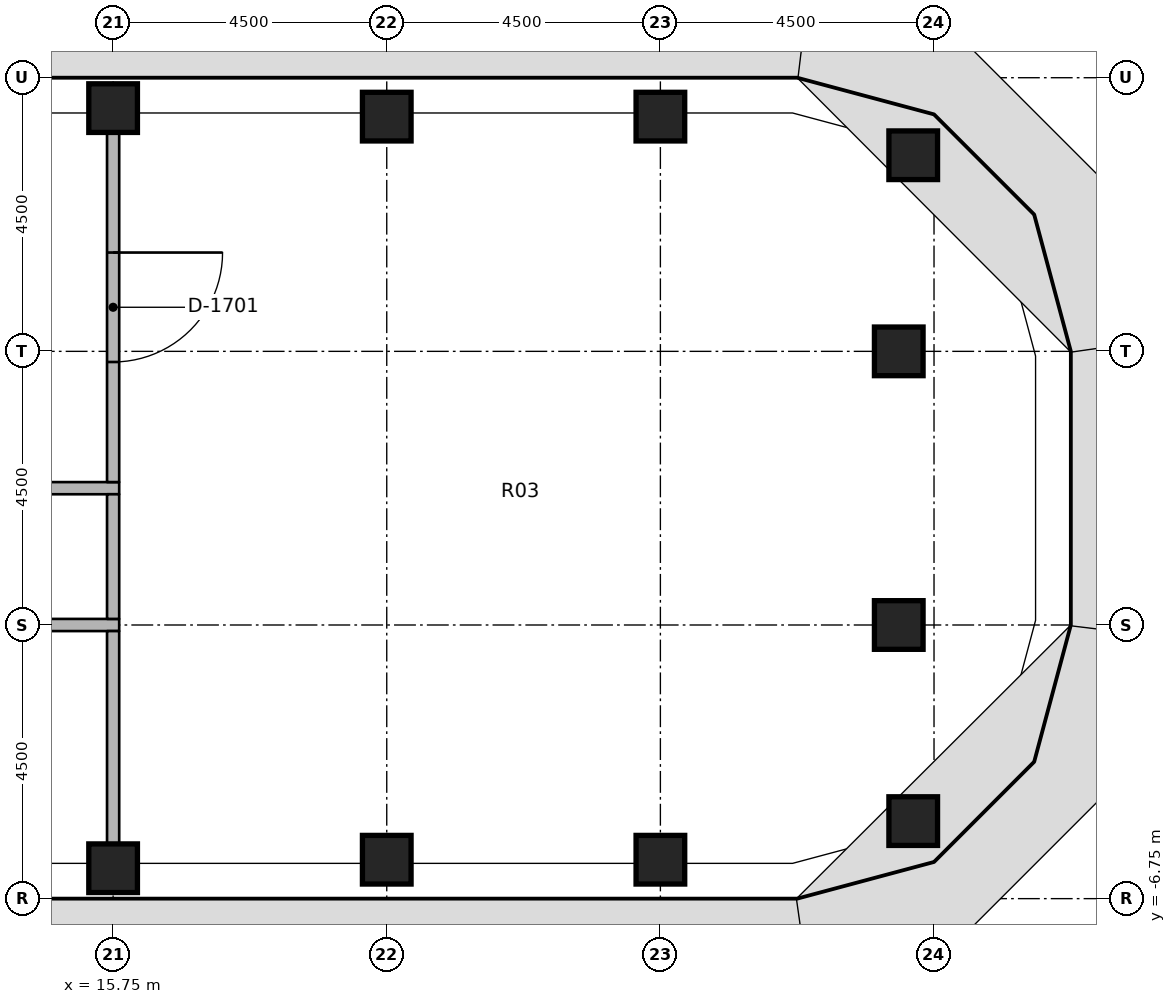
"""IFC4 building model, lengths in metres.
Left out: names, types, materials, properties, quantities, classifications, styles, units other than length and angle.
Written with IfcOpenShell. Run it as: python <this file> out.ifc"""

import sys

from ifc_helpers import new_model, si_unit, direction, frame, frame_2d, origin, origin_2d, place, context, subcontext, project, spatial, rectangle, extrude, element, fill, save


model = new_model("IFC4")
c1 = context("Model", 3, precision=1e-05, world=origin(), true_north=direction((0.0, 1.0)))
c2 = subcontext(c1, "Body", "Model", "MODEL_VIEW")
j1 = project(units=[si_unit("LENGTHUNIT", "METRE"), si_unit("PLANEANGLEUNIT", "RADIAN")], contexts=[c1])
p1 = place(None, origin())
s1 = spatial("IfcSite", under=j1, at=p1, CompositionType="ELEMENT")
p2 = place(p1, origin())
s2 = spatial("IfcBuilding", under=s1, at=p2, CompositionType="ELEMENT")
p3 = place(p2, frame((0.0, 0.0, 160.0)))
s3 = spatial("IfcBuildingStorey", under=s2, at=p3, CompositionType="ELEMENT", Elevation=160.0)
for number, where, z_axis, x_axis in (
    (1, (15.75, -6.25, 0.0), (0.0, 0.0, 1.0), (1.0, 0.0, 0.0)),
    (2, (15.75, 6.25, 0.0), (0.0, 0.0, 1.0), (1.0, 0.0, 0.0)),
    (3, (20.25, -6.11, 0.0), (0.0, 0.0, 1.0), (1.0, 0.0, 0.0)),
    (4, (20.25, 6.11, 0.0), (0.0, 0.0, 1.0), (1.0, 0.0, 0.0)),
    (5, (24.75, -6.11, 0.0), (0.0, 0.0, 1.0), (1.0, 0.0, 0.0)),
    (6, (24.75, 6.11, 0.0), (0.0, 0.0, 1.0), (1.0, 0.0, 0.0)),
    (7, (28.908, -5.475, 0.0), (0.0, 0.0, 1.0), (1.0, 0.0, 0.0)),
    (8, (28.67, -2.25, 0.0), (0.0, 0.0, 1.0), (1.0, 0.0, 0.0)),
    (9, (28.67, 2.25, 0.0), (0.0, 0.0, 1.0), (1.0, 0.0, 0.0)),
    (10, (28.908, 5.475, 0.0), (0.0, 0.0, 1.0), (1.0, 0.0, 0.0)),
):
    element("IfcColumn", number, at=place(p3, frame(where, z_axis=z_axis, x_axis=x_axis)), inside=s3, PredefinedType="COLUMN", context=c2, shape_type="SweptSolid", body=[
        extrude(rectangle(XDim=0.8, YDim=0.8, at=origin_2d()), origin(), (0.0, 0.0, 1.0), 3.65),
    ])
p4 = place(p3, frame((11.15, 0.0, 0.0), z_axis=(0.0, 0.0, 1.0), x_axis=(1.0, 0.0, 0.0)))
e11 = element("IfcWall", 11, at=p4, inside=s3, PredefinedType="PARTITIONING", context=c2, shape_type="SweptSolid", body=[
    extrude(rectangle(XDim=4.7, YDim=0.2, at=frame_2d((2.35, 0.0))), origin(), (0.0, 0.0, 1.0), 2.75),
])
p5 = place(p4, frame((1.85, 0.0, 0.0)))
e12 = element("IfcOpeningElement", 12, at=p5, cuts=e11, PredefinedType="OPENING", context=c2, shape_type="SweptSolid", body=[
    extrude(rectangle(XDim=1.0, YDim=2.1, at=frame_2d((0.5, 1.05))), frame((0.0, 0.11, 0.0), z_axis=(0.0, -1.0, 0.0), x_axis=(1.0, 0.0, 0.0)), (0.0, 0.0, 1.0), 0.22),
])
p6 = place(p3, frame((15.85, -2.25, 0.0), z_axis=(0.0, 0.0, 1.0), x_axis=(-1.0, 0.0, 0.0)))
e13 = element("IfcWall", 13, at=p6, inside=s3, PredefinedType="PARTITIONING", context=c2, shape_type="SweptSolid", body=[
    extrude(rectangle(XDim=4.7, YDim=0.2, at=frame_2d((2.35, 0.0))), origin(), (0.0, 0.0, 1.0), 2.75),
])
p7 = place(p6, frame((1.85, 0.0, 0.0)))
e14 = element("IfcOpeningElement", 14, at=p7, cuts=e13, PredefinedType="OPENING", context=c2, shape_type="SweptSolid", body=[
    extrude(rectangle(XDim=1.0, YDim=2.1, at=frame_2d((0.5, 1.05))), frame((0.0, 0.11, 0.0), z_axis=(0.0, -1.0, 0.0), x_axis=(1.0, 0.0, 0.0)), (0.0, 0.0, 1.0), 0.22),
])
p8 = place(p3, frame((15.75, -2.15, 0.0), z_axis=(0.0, 0.0, 1.0), x_axis=(0.0, 1.0, 0.0)))
e15 = element("IfcWall", 15, at=p8, inside=s3, PredefinedType="PARTITIONING", context=c2, shape_type="SweptSolid", body=[
    extrude(rectangle(XDim=2.05, YDim=0.2, at=frame_2d((1.025, 0.0))), origin(), (0.0, 0.0, 1.0), 2.75),
])
p9 = place(p3, frame((15.75, 5.85, 0.0), z_axis=(0.0, 0.0, 1.0), x_axis=(0.0, -1.0, 0.0)))
e16 = element("IfcWall", 16, at=p9, inside=s3, PredefinedType="PARTITIONING", context=c2, shape_type="SweptSolid", body=[
    extrude(rectangle(XDim=5.75, YDim=0.2, at=frame_2d((2.875, 0.0))), origin(), (0.0, 0.0, 1.0), 2.75),
])
p10 = place(p9, frame((1.975, 0.0, 0.0)))
e17 = element("IfcOpeningElement", 17, at=p10, cuts=e16, PredefinedType="OPENING", context=c2, shape_type="SweptSolid", body=[
    extrude(rectangle(XDim=1.8, YDim=2.1, at=frame_2d((0.9, 1.05))), frame((0.0, 0.11, 0.0), z_axis=(0.0, -1.0, 0.0), x_axis=(1.0, 0.0, 0.0)), (0.0, 0.0, 1.0), 0.22),
])
p11 = place(p3, frame((15.75, -5.85, 0.0), z_axis=(0.0, 0.0, 1.0), x_axis=(0.0, 1.0, 0.0)))
e18 = element("IfcWall", 18, at=p11, inside=s3, PredefinedType="PARTITIONING", context=c2, shape_type="SweptSolid", body=[
    extrude(rectangle(XDim=3.5, YDim=0.2, at=frame_2d((1.75, 0.0))), origin(), (0.0, 0.0, 1.0), 2.75),
])
p12 = place(p10, origin())
e19 = element("IfcDoor", 19, at=p12, inside=s3, OperationType="DOUBLE_DOOR_SINGLE_SWING", PredefinedType="DOOR", context=c2, shape_type="SweptSolid", body=[
    extrude(rectangle(XDim=1.8, YDim=2.1, at=frame_2d((0.9, 1.05))), frame((0.0, 0.025, 0.0), z_axis=(0.0, -1.0, 0.0), x_axis=(1.0, 0.0, 0.0)), (0.0, 0.0, 1.0), 0.05),
])
fill(e17, e19)
save(model, sys.argv[1])
